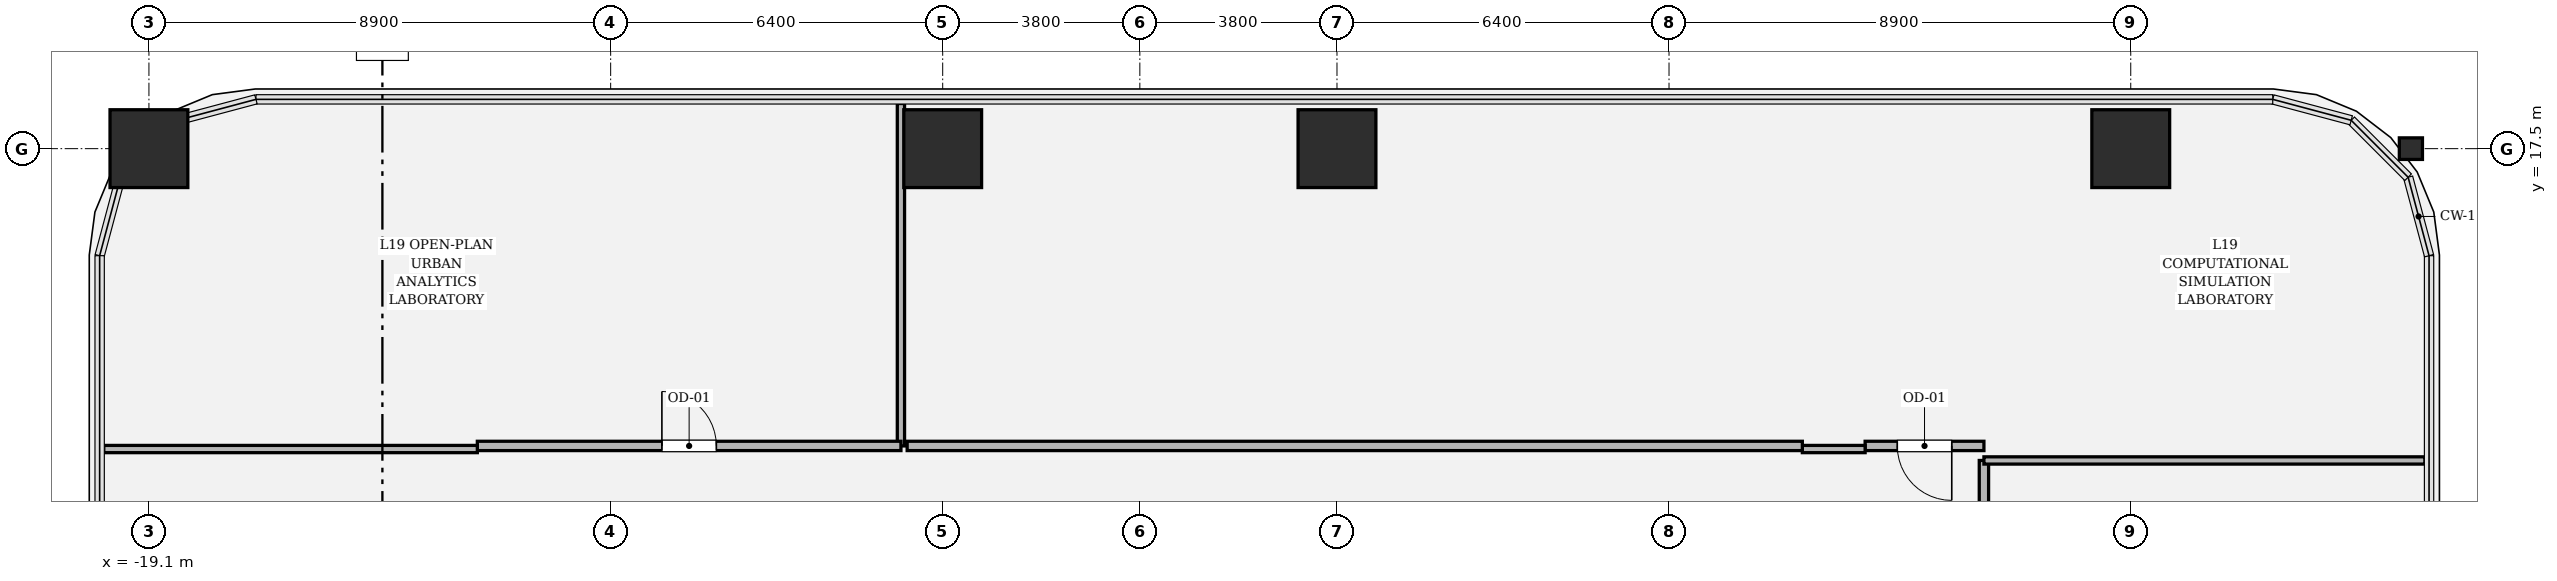
"""IFC4 building model, lengths in metres.
Left out: names, types, materials, properties, quantities, classifications, styles, units other than length and angle.
Written with IfcOpenShell. Run it as: python <this file> out.ifc"""

import sys

from ifc_helpers import new_model, si_unit, direction, frame, frame_2d, origin, origin_2d, place, context, subcontext, project, spatial, rectangle, hollow_rectangle, i_section, extrude, element, fill, save


model = new_model("IFC4")
c1 = context("Model", 3, precision=1e-05, world=origin(), true_north=direction((0.0, 1.0)))
c2 = subcontext(c1, "Body", "Model", "MODEL_VIEW")
j1 = project(units=[si_unit("LENGTHUNIT", "METRE"), si_unit("PLANEANGLEUNIT", "RADIAN")], contexts=[c1])
p1 = place(None, origin())
s1 = spatial("IfcSite", under=j1, at=p1, CompositionType="ELEMENT")
p2 = place(p1, origin())
s2 = spatial("IfcBuilding", under=s1, at=p2, CompositionType="ELEMENT")
p3 = place(p2, frame((0.0, 0.0, 84.9)))
s3 = spatial("IfcBuildingStorey", under=s2, at=p3, CompositionType="ELEMENT", Elevation=84.9)
for number, where, z_axis, x_axis in (
    (1, (19.1, 17.5, 0.0), (0.0, 0.0, 1.0), (1.0, 0.0, 0.0)),
    (2, (3.8, 17.5, 0.0), (0.0, 0.0, 1.0), (1.0, 0.0, 0.0)),
    (3, (-3.8, 17.5, 0.0), (0.0, 0.0, 1.0), (1.0, 0.0, 0.0)),
    (4, (-19.1, 17.5, 0.0), (0.0, 0.0, 1.0), (1.0, 0.0, 0.0)),
):
    element("IfcColumn", number, at=place(p3, frame(where, z_axis=z_axis, x_axis=x_axis)), inside=s3, PredefinedType="COLUMN", context=c2, shape_type="SweptSolid", body=[
        extrude(hollow_rectangle(XDim=1.5, YDim=1.5, WallThickness=0.045, at=origin_2d()), origin(), (0.0, 0.0, 1.0), 4.05),
    ])
p4 = place(p3, frame((24.5, 17.5, 0.0), z_axis=(0.0, 0.0, 1.0), x_axis=(0.0, 1.0, 0.0)))
e5 = element("IfcColumn", 5, at=p4, inside=s3, PredefinedType="COLUMN", context=c2, shape_type="SweptSolid", body=[
    extrude(i_section(OverallWidth=0.416, OverallDepth=0.446, WebThickness=0.039, FlangeThickness=0.062, FilletRadius=0.018, at=origin_2d()), origin(), (0.0, 0.0, 1.0), 4.048),
])
p5 = place(p3, frame((16.27, 4.05, 0.0), z_axis=(0.0, 0.0, 1.0), x_axis=(0.0, 1.0, 0.0)))
e6 = element("IfcWall", 6, at=p5, inside=s3, PredefinedType="PARTITIONING", context=c2, shape_type="SweptSolid", body=[
    extrude(rectangle(XDim=7.44, YDim=0.18, at=frame_2d((3.72, 0.0))), origin(), (0.0, 0.0, 1.0), 3.104),
])
p6 = place(p5, frame((3.195, 0.0, 0.0)))
e7 = element("IfcOpeningElement", 7, at=p6, cuts=e6, PredefinedType="OPENING", context=c2, shape_type="SweptSolid", body=[
    extrude(rectangle(XDim=1.05, YDim=2.2, at=frame_2d((0.525, 1.1))), frame((0.0, 0.1, 0.0), z_axis=(0.0, -1.0, 0.0), x_axis=(1.0, 0.0, 0.0)), (0.0, 0.0, 1.0), 0.2),
])
p7 = place(p3, frame((16.27, 11.49, 0.0), z_axis=(0.0, 0.0, 1.0), x_axis=(1.0, 0.0, 0.0)))
e8 = element("IfcWall", 8, at=p7, inside=s3, PredefinedType="PARTITIONING", context=c2, shape_type="SweptSolid", body=[
    extrude(rectangle(XDim=8.5, YDim=0.14, at=frame_2d((4.25, 0.0))), origin(), (0.0, 0.0, 1.0), 2.524),
])
p8 = place(p3, frame((-4.605, 18.37, 0.0), z_axis=(0.0, 0.0, 1.0), x_axis=(0.0, -1.0, 0.0)))
e9 = element("IfcWall", 9, at=p8, inside=s3, PredefinedType="PARTITIONING", context=c2, shape_type="SweptSolid", body=[
    extrude(rectangle(XDim=6.6, YDim=0.14, at=frame_2d((3.3, 0.0))), origin(), (0.0, 0.0, 1.0), 3.104),
])
p9 = place(p3, frame((-4.605, 11.77, 0.0), z_axis=(0.0, 0.0, 1.0), x_axis=(-1.0, 0.0, 0.0)))
e10 = element("IfcWall", 10, at=p9, inside=s3, PredefinedType="PARTITIONING", context=c2, shape_type="SweptSolid", body=[
    extrude(rectangle(XDim=8.165, YDim=0.18, at=frame_2d((4.083, 0.0))), origin(), (0.0, 0.0, 1.0), 3.104),
])
p10 = place(p9, frame((3.558, 0.0, 0.0)))
e11 = element("IfcOpeningElement", 11, at=p10, cuts=e10, PredefinedType="OPENING", context=c2, shape_type="SweptSolid", body=[
    extrude(rectangle(XDim=1.05, YDim=2.2, at=frame_2d((0.525, 1.1))), frame((0.0, 0.1, 0.0), z_axis=(0.0, -1.0, 0.0), x_axis=(1.0, 0.0, 0.0)), (0.0, 0.0, 1.0), 0.2),
])
p11 = place(p3, frame((-12.77, 11.71, 0.0), z_axis=(0.0, 0.0, 1.0), x_axis=(-1.0, 0.0, 0.0)))
e12 = element("IfcWall", 12, at=p11, inside=s3, PredefinedType="PARTITIONING", context=c2, shape_type="SweptSolid", body=[
    extrude(rectangle(XDim=7.2, YDim=0.14, at=frame_2d((3.6, 0.0))), origin(), (0.0, 0.0, 1.0), 3.104),
])
p12 = place(p3, frame((16.27, 11.77, 0.0), z_axis=(0.0, 0.0, 1.0), x_axis=(-1.0, 0.0, 0.0)))
e13 = element("IfcWall", 13, at=p12, inside=s3, PredefinedType="PARTITIONING", context=c2, shape_type="SweptSolid", body=[
    extrude(rectangle(XDim=2.29, YDim=0.18, at=frame_2d((1.145, 0.0))), origin(), (0.0, 0.0, 1.0), 3.354),
])
p13 = place(p12, frame((0.62, 0.0, 0.0)))
e14 = element("IfcOpeningElement", 14, at=p13, cuts=e13, PredefinedType="OPENING", context=c2, shape_type="SweptSolid", body=[
    extrude(rectangle(XDim=1.05, YDim=2.2, at=frame_2d((0.525, 1.1))), frame((0.0, 0.1, 0.0), z_axis=(0.0, -1.0, 0.0), x_axis=(1.0, 0.0, 0.0)), (0.0, 0.0, 1.0), 0.2),
])
p14 = place(p3, frame((13.98, 11.71, 0.0), z_axis=(0.0, 0.0, 1.0), x_axis=(-1.0, 0.0, 0.0)))
e15 = element("IfcWall", 15, at=p14, inside=s3, PredefinedType="PARTITIONING", context=c2, shape_type="SweptSolid", body=[
    extrude(rectangle(XDim=1.21, YDim=0.14, at=frame_2d((0.605, 0.0))), origin(), (0.0, 0.0, 1.0), 3.81),
])
p15 = place(p3, frame((12.77, 11.77, 0.0), z_axis=(0.0, 0.0, 1.0), x_axis=(-1.0, 0.0, 0.0)))
e16 = element("IfcWall", 16, at=p15, inside=s3, PredefinedType="PARTITIONING", context=c2, shape_type="SweptSolid", body=[
    extrude(rectangle(XDim=17.255, YDim=0.18, at=frame_2d((8.627, 0.0))), origin(), (0.0, 0.0, 1.0), 3.104),
])
p16 = place(p10, origin())
e17 = element("IfcDoor", 17, at=p16, inside=s3, OperationType="SINGLE_SWING_RIGHT", PredefinedType="DOOR", context=c2, shape_type="SweptSolid", body=[
    extrude(rectangle(XDim=1.05, YDim=2.2, at=frame_2d((0.525, 1.1))), frame((0.0, 0.025, 0.0), z_axis=(0.0, -1.0, 0.0), x_axis=(1.0, 0.0, 0.0)), (0.0, 0.0, 1.0), 0.05),
])
fill(e11, e17)
p17 = place(p13, origin())
e18 = element("IfcDoor", 18, at=p17, inside=s3, OperationType="SINGLE_SWING_LEFT", PredefinedType="DOOR", context=c2, shape_type="SweptSolid", body=[
    extrude(rectangle(XDim=1.05, YDim=2.2, at=frame_2d((0.525, 1.1))), frame((0.0, 0.025, 0.0), z_axis=(0.0, -1.0, 0.0), x_axis=(1.0, 0.0, 0.0)), (0.0, 0.0, 1.0), 0.05),
])
fill(e14, e18)
save(model, sys.argv[1])
